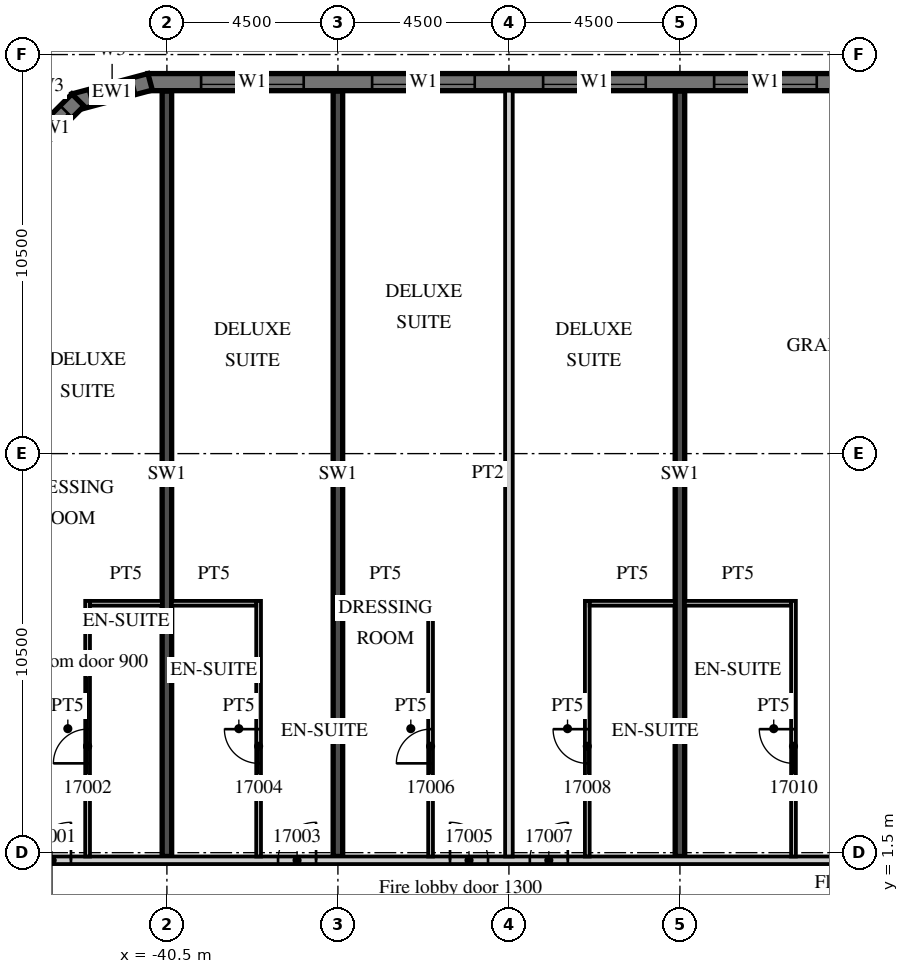
"""IFC4 building model, lengths in metres.
Left out: names, types, materials, properties, quantities, classifications, styles, units other than length and angle.
Written with IfcOpenShell. Run it as: python <this file> out.ifc"""

import sys

from ifc_helpers import new_model, si_unit, direction, frame, frame_2d, origin, place, context, subcontext, project, spatial, polyline, rectangle, outline, extrude, element, fill, save


model = new_model("IFC4")
c1 = context("Model", 3, precision=1e-05, world=origin(), true_north=direction((0.0, 1.0)))
c2 = subcontext(c1, "Body", "Model", "MODEL_VIEW")
j1 = project(units=[si_unit("LENGTHUNIT", "METRE"), si_unit("PLANEANGLEUNIT", "RADIAN")], contexts=[c1])
p1 = place(None, origin())
s1 = spatial("IfcSite", under=j1, at=p1, CompositionType="ELEMENT")
p2 = place(p1, origin())
s2 = spatial("IfcBuilding", under=s1, at=p2, CompositionType="ELEMENT")
p3 = place(p2, frame((0.0, 0.0, 86.4)))
s3 = spatial("IfcBuildingStorey", under=s2, at=p3, CompositionType="ELEMENT", Elevation=86.4)
for number, where, z_axis, x_axis in (
    (1, (-40.5, 1.4, 0.0), (0.0, 0.0, 1.0), (0.0, 1.0, 0.0)),
    (2, (-36.0, 1.4, 0.0), (0.0, 0.0, 1.0), (0.0, 1.0, 0.0)),
    (3, (-27.0, 1.4, 0.0), (0.0, 0.0, 1.0), (0.0, 1.0, 0.0)),
):
    element("IfcWall", number, at=place(p3, frame(where, z_axis=z_axis, x_axis=x_axis)), inside=s3, PredefinedType="SHEAR", context=c2, shape_type="SweptSolid", body=[
        extrude(rectangle(XDim=20.14, YDim=0.25, at=frame_2d((10.07, 0.0))), origin(), (0.0, 0.0, 1.0), 3.3),
    ])
p4 = place(p3, frame((13.5, 21.775, 0.0), z_axis=(0.0, 0.0, 1.0), x_axis=(-1.0, 0.0, 0.0)))
e4 = element("IfcWall", 4, at=p4, inside=s3, PredefinedType="SOLIDWALL", context=c2, shape_type="SweptSolid", body=[
    extrude(rectangle(XDim=54.5, YDim=0.45, at=frame_2d((27.25, 0.0))), origin(), (0.0, 0.0, 1.0), 3.02),
])
p5 = place(p4, frame((0.9, 0.0, 0.45)))
e5 = element("IfcOpeningElement", 5, at=p5, cuts=e4, PredefinedType="OPENING", context=c2, shape_type="SweptSolid", body=[
    extrude(rectangle(XDim=2.7, YDim=2.25, at=frame_2d((1.35, 1.125))), frame((0.0, 0.235, 0.0), z_axis=(0.0, -1.0, 0.0), x_axis=(1.0, 0.0, 0.0)), (0.0, 0.0, 1.0), 0.47),
])
p6 = place(p4, frame((5.4, 0.0, 0.45)))
e6 = element("IfcOpeningElement", 6, at=p6, cuts=e4, PredefinedType="OPENING", context=c2, shape_type="SweptSolid", body=[
    extrude(rectangle(XDim=2.7, YDim=2.25, at=frame_2d((1.35, 1.125))), frame((0.0, 0.235, 0.0), z_axis=(0.0, -1.0, 0.0), x_axis=(1.0, 0.0, 0.0)), (0.0, 0.0, 1.0), 0.47),
])
p7 = place(p4, frame((9.9, 0.0, 0.45)))
e7 = element("IfcOpeningElement", 7, at=p7, cuts=e4, PredefinedType="OPENING", context=c2, shape_type="SweptSolid", body=[
    extrude(rectangle(XDim=2.7, YDim=2.25, at=frame_2d((1.35, 1.125))), frame((0.0, 0.235, 0.0), z_axis=(0.0, -1.0, 0.0), x_axis=(1.0, 0.0, 0.0)), (0.0, 0.0, 1.0), 0.47),
])
p8 = place(p4, frame((14.4, 0.0, 0.45)))
e8 = element("IfcOpeningElement", 8, at=p8, cuts=e4, PredefinedType="OPENING", context=c2, shape_type="SweptSolid", body=[
    extrude(rectangle(XDim=2.7, YDim=2.25, at=frame_2d((1.35, 1.125))), frame((0.0, 0.235, 0.0), z_axis=(0.0, -1.0, 0.0), x_axis=(1.0, 0.0, 0.0)), (0.0, 0.0, 1.0), 0.47),
])
p9 = place(p4, frame((18.9, 0.0, 0.45)))
e9 = element("IfcOpeningElement", 9, at=p9, cuts=e4, PredefinedType="OPENING", context=c2, shape_type="SweptSolid", body=[
    extrude(rectangle(XDim=2.7, YDim=2.25, at=frame_2d((1.35, 1.125))), frame((0.0, 0.235, 0.0), z_axis=(0.0, -1.0, 0.0), x_axis=(1.0, 0.0, 0.0)), (0.0, 0.0, 1.0), 0.47),
])
p10 = place(p4, frame((23.4, 0.0, 0.45)))
e10 = element("IfcOpeningElement", 10, at=p10, cuts=e4, PredefinedType="OPENING", context=c2, shape_type="SweptSolid", body=[
    extrude(rectangle(XDim=2.7, YDim=2.25, at=frame_2d((1.35, 1.125))), frame((0.0, 0.235, 0.0), z_axis=(0.0, -1.0, 0.0), x_axis=(1.0, 0.0, 0.0)), (0.0, 0.0, 1.0), 0.47),
])
p11 = place(p4, frame((27.9, 0.0, 0.45)))
e11 = element("IfcOpeningElement", 11, at=p11, cuts=e4, PredefinedType="OPENING", context=c2, shape_type="SweptSolid", body=[
    extrude(rectangle(XDim=2.7, YDim=2.25, at=frame_2d((1.35, 1.125))), frame((0.0, 0.235, 0.0), z_axis=(0.0, -1.0, 0.0), x_axis=(1.0, 0.0, 0.0)), (0.0, 0.0, 1.0), 0.47),
])
p12 = place(p4, frame((32.4, 0.0, 0.45)))
e12 = element("IfcOpeningElement", 12, at=p12, cuts=e4, PredefinedType="OPENING", context=c2, shape_type="SweptSolid", body=[
    extrude(rectangle(XDim=2.7, YDim=2.25, at=frame_2d((1.35, 1.125))), frame((0.0, 0.235, 0.0), z_axis=(0.0, -1.0, 0.0), x_axis=(1.0, 0.0, 0.0)), (0.0, 0.0, 1.0), 0.47),
])
p13 = place(p4, frame((36.9, 0.0, 0.45)))
e13 = element("IfcOpeningElement", 13, at=p13, cuts=e4, PredefinedType="OPENING", context=c2, shape_type="SweptSolid", body=[
    extrude(rectangle(XDim=2.7, YDim=2.25, at=frame_2d((1.35, 1.125))), frame((0.0, 0.235, 0.0), z_axis=(0.0, -1.0, 0.0), x_axis=(1.0, 0.0, 0.0)), (0.0, 0.0, 1.0), 0.47),
])
p14 = place(p4, frame((41.4, 0.0, 0.45)))
e14 = element("IfcOpeningElement", 14, at=p14, cuts=e4, PredefinedType="OPENING", context=c2, shape_type="SweptSolid", body=[
    extrude(rectangle(XDim=2.7, YDim=2.25, at=frame_2d((1.35, 1.125))), frame((0.0, 0.235, 0.0), z_axis=(0.0, -1.0, 0.0), x_axis=(1.0, 0.0, 0.0)), (0.0, 0.0, 1.0), 0.47),
])
p15 = place(p4, frame((45.9, 0.0, 0.45)))
e15 = element("IfcOpeningElement", 15, at=p15, cuts=e4, PredefinedType="OPENING", context=c2, shape_type="SweptSolid", body=[
    extrude(rectangle(XDim=2.7, YDim=2.25, at=frame_2d((1.35, 1.125))), frame((0.0, 0.235, 0.0), z_axis=(0.0, -1.0, 0.0), x_axis=(1.0, 0.0, 0.0)), (0.0, 0.0, 1.0), 0.47),
])
p16 = place(p4, frame((50.4, 0.0, 0.45)))
e16 = element("IfcOpeningElement", 16, at=p16, cuts=e4, PredefinedType="OPENING", context=c2, shape_type="SweptSolid", body=[
    extrude(rectangle(XDim=2.7, YDim=2.25, at=frame_2d((1.35, 1.125))), frame((0.0, 0.235, 0.0), z_axis=(0.0, -1.0, 0.0), x_axis=(1.0, 0.0, 0.0)), (0.0, 0.0, 1.0), 0.47),
])
p17 = place(p3, frame((-40.942, 21.783, 0.0), z_axis=(0.0, 0.0, 1.0), x_axis=(-0.965926999034, -0.25881466832, 0.0)))
e17 = element("IfcWall", 17, at=p17, inside=s3, PredefinedType="SOLIDWALL", context=c2, shape_type="SweptSolid", body=[
    extrude(outline(polyline([(0.0, -0.225), (2.071, -0.225), (1.95, 0.225), (0.121, 0.225), (0.0, -0.225)])), origin(), (0.0, 0.0, 1.0), 3.02),
])
p18 = place(p17, frame((0.435, 0.0, 0.45)))
e18 = element("IfcOpeningElement", 18, at=p18, cuts=e17, PredefinedType="OPENING", context=c2, shape_type="SweptSolid", body=[
    extrude(rectangle(XDim=1.2, YDim=2.25, at=frame_2d((0.6, 1.125))), frame((0.0, 0.235, 0.0), z_axis=(0.0, -1.0, 0.0), x_axis=(1.0, 0.0, 0.0)), (0.0, 0.0, 1.0), 0.47),
])
p19 = place(p3, frame((-42.841, 21.305, 0.0), z_axis=(0.0, 0.0, 1.0), x_axis=(-0.707106781187, -0.707106781187, 0.0)))
e19 = element("IfcWall", 19, at=p19, inside=s3, PredefinedType="SOLIDWALL", context=c2, shape_type="SweptSolid", body=[
    extrude(outline(polyline([(0.0, -0.225), (2.071, -0.225), (1.95, 0.225), (0.121, 0.225), (0.0, -0.225)])), origin(), (0.0, 0.0, 1.0), 3.02),
])
p20 = place(p19, frame((0.435, 0.0, 0.45)))
e20 = element("IfcOpeningElement", 20, at=p20, cuts=e19, PredefinedType="OPENING", context=c2, shape_type="SweptSolid", body=[
    extrude(rectangle(XDim=1.2, YDim=2.25, at=frame_2d((0.6, 1.125))), frame((0.0, 0.235, 0.0), z_axis=(0.0, -1.0, 0.0), x_axis=(1.0, 0.0, 0.0)), (0.0, 0.0, 1.0), 0.47),
])
p21 = place(p3, frame((-44.55, 1.3, 0.0), z_axis=(0.0, 0.0, 1.0), x_axis=(1.0, 0.0, 0.0)))
e21 = element("IfcWall", 21, at=p21, inside=s3, PredefinedType="PARTITIONING", context=c2, shape_type="SweptSolid", body=[
    extrude(rectangle(XDim=58.05, YDim=0.2, at=frame_2d((29.025, 0.0))), origin(), (0.0, 0.0, 1.0), 3.02),
])
p22 = place(p21, frame((0.525, 0.0, 0.0)))
e22 = element("IfcOpeningElement", 22, at=p22, cuts=e21, PredefinedType="OPENING", context=c2, shape_type="SweptSolid", body=[
    extrude(rectangle(XDim=1.0, YDim=2.1, at=frame_2d((0.5, 1.05))), frame((0.0, 0.11, 0.0), z_axis=(0.0, -1.0, 0.0), x_axis=(1.0, 0.0, 0.0)), (0.0, 0.0, 1.0), 0.22),
])
p23 = place(p21, frame((6.975, 0.0, 0.0)))
e23 = element("IfcOpeningElement", 23, at=p23, cuts=e21, PredefinedType="OPENING", context=c2, shape_type="SweptSolid", body=[
    extrude(rectangle(XDim=1.0, YDim=2.1, at=frame_2d((0.5, 1.05))), frame((0.0, 0.11, 0.0), z_axis=(0.0, -1.0, 0.0), x_axis=(1.0, 0.0, 0.0)), (0.0, 0.0, 1.0), 0.22),
])
p24 = place(p21, frame((11.5, 0.0, 0.0)))
e24 = element("IfcOpeningElement", 24, at=p24, cuts=e21, PredefinedType="OPENING", context=c2, shape_type="SweptSolid", body=[
    extrude(rectangle(XDim=1.0, YDim=2.1, at=frame_2d((0.5, 1.05))), frame((0.0, 0.11, 0.0), z_axis=(0.0, -1.0, 0.0), x_axis=(1.0, 0.0, 0.0)), (0.0, 0.0, 1.0), 0.22),
])
p25 = place(p21, frame((13.6, 0.0, 0.0)))
e25 = element("IfcOpeningElement", 25, at=p25, cuts=e21, PredefinedType="OPENING", context=c2, shape_type="SweptSolid", body=[
    extrude(rectangle(XDim=1.0, YDim=2.1, at=frame_2d((0.5, 1.05))), frame((0.0, 0.11, 0.0), z_axis=(0.0, -1.0, 0.0), x_axis=(1.0, 0.0, 0.0)), (0.0, 0.0, 1.0), 0.22),
])
p26 = place(p21, frame((22.912, 0.0, 0.0)))
e26 = element("IfcOpeningElement", 26, at=p26, cuts=e21, PredefinedType="OPENING", context=c2, shape_type="SweptSolid", body=[
    extrude(rectangle(XDim=1.2, YDim=2.1, at=frame_2d((0.6, 1.05))), frame((0.0, 0.11, 0.0), z_axis=(0.0, -1.0, 0.0), x_axis=(1.0, 0.0, 0.0)), (0.0, 0.0, 1.0), 0.22),
])
p27 = place(p21, frame((31.912, 0.0, 0.0)))
e27 = element("IfcOpeningElement", 27, at=p27, cuts=e21, PredefinedType="OPENING", context=c2, shape_type="SweptSolid", body=[
    extrude(rectangle(XDim=1.2, YDim=2.1, at=frame_2d((0.6, 1.05))), frame((0.0, 0.11, 0.0), z_axis=(0.0, -1.0, 0.0), x_axis=(1.0, 0.0, 0.0)), (0.0, 0.0, 1.0), 0.22),
])
p28 = place(p21, frame((37.987, 0.0, 0.0)))
e28 = element("IfcOpeningElement", 28, at=p28, cuts=e21, PredefinedType="OPENING", context=c2, shape_type="SweptSolid", body=[
    extrude(rectangle(XDim=1.2, YDim=2.1, at=frame_2d((0.6, 1.05))), frame((0.0, 0.11, 0.0), z_axis=(0.0, -1.0, 0.0), x_axis=(1.0, 0.0, 0.0)), (0.0, 0.0, 1.0), 0.22),
])
p29 = place(p21, frame((46.987, 0.0, 0.0)))
e29 = element("IfcOpeningElement", 29, at=p29, cuts=e21, PredefinedType="OPENING", context=c2, shape_type="SweptSolid", body=[
    extrude(rectangle(XDim=1.2, YDim=2.1, at=frame_2d((0.6, 1.05))), frame((0.0, 0.11, 0.0), z_axis=(0.0, -1.0, 0.0), x_axis=(1.0, 0.0, 0.0)), (0.0, 0.0, 1.0), 0.22),
])
p30 = place(p21, frame((54.125, 0.0, 0.0)))
e30 = element("IfcOpeningElement", 30, at=p30, cuts=e21, PredefinedType="OPENING", context=c2, shape_type="SweptSolid", body=[
    extrude(rectangle(XDim=1.0, YDim=2.1, at=frame_2d((0.5, 1.05))), frame((0.0, 0.11, 0.0), z_axis=(0.0, -1.0, 0.0), x_axis=(1.0, 0.0, 0.0)), (0.0, 0.0, 1.0), 0.22),
])
p31 = place(p3, frame((-42.587, 1.4, 0.0), z_axis=(0.0, 0.0, 1.0), x_axis=(0.0, 1.0, 0.0)))
e31 = element("IfcWall", 31, at=p31, inside=s3, PredefinedType="PARTITIONING", context=c2, shape_type="SweptSolid", body=[
    extrude(rectangle(XDim=6.725, YDim=0.125, at=frame_2d((3.363, 0.0))), origin(), (0.0, 0.0, 1.0), 3.02),
])
p32 = place(p31, frame((2.45, 0.0, 0.0)))
e32 = element("IfcOpeningElement", 32, at=p32, cuts=e31, PredefinedType="OPENING", context=c2, shape_type="SweptSolid", body=[
    extrude(rectangle(XDim=0.9, YDim=2.1, at=frame_2d((0.45, 1.05))), frame((0.0, 0.073, 0.0), z_axis=(0.0, -1.0, 0.0), x_axis=(1.0, 0.0, 0.0)), (0.0, 0.0, 1.0), 0.145),
])
p33 = place(p3, frame((-42.525, 8.062, 0.0), z_axis=(0.0, 0.0, 1.0), x_axis=(1.0, 0.0, 0.0)))
e33 = element("IfcWall", 33, at=p33, inside=s3, PredefinedType="PARTITIONING", context=c2, shape_type="SweptSolid", body=[
    extrude(rectangle(XDim=1.9, YDim=0.125, at=frame_2d((0.95, 0.0))), origin(), (0.0, 0.0, 1.0), 3.02),
])
p34 = place(p3, frame((-38.087, 1.4, 0.0), z_axis=(0.0, 0.0, 1.0), x_axis=(0.0, 1.0, 0.0)))
e34 = element("IfcWall", 34, at=p34, inside=s3, PredefinedType="PARTITIONING", context=c2, shape_type="SweptSolid", body=[
    extrude(rectangle(XDim=6.725, YDim=0.125, at=frame_2d((3.363, 0.0))), origin(), (0.0, 0.0, 1.0), 3.02),
])
p35 = place(p34, frame((2.45, 0.0, 0.0)))
e35 = element("IfcOpeningElement", 35, at=p35, cuts=e34, PredefinedType="OPENING", context=c2, shape_type="SweptSolid", body=[
    extrude(rectangle(XDim=0.9, YDim=2.1, at=frame_2d((0.45, 1.05))), frame((0.0, 0.073, 0.0), z_axis=(0.0, -1.0, 0.0), x_axis=(1.0, 0.0, 0.0)), (0.0, 0.0, 1.0), 0.145),
])
p36 = place(p3, frame((-40.375, 8.062, 0.0), z_axis=(0.0, 0.0, 1.0), x_axis=(1.0, 0.0, 0.0)))
e36 = element("IfcWall", 36, at=p36, inside=s3, PredefinedType="PARTITIONING", context=c2, shape_type="SweptSolid", body=[
    extrude(rectangle(XDim=2.225, YDim=0.125, at=frame_2d((1.113, 0.0))), origin(), (0.0, 0.0, 1.0), 3.02),
])
p37 = place(p3, frame((-31.5, 1.4, 0.0), z_axis=(0.0, 0.0, 1.0), x_axis=(0.0, 1.0, 0.0)))
e37 = element("IfcWall", 37, at=p37, inside=s3, PredefinedType="PARTITIONING", context=c2, shape_type="SweptSolid", body=[
    extrude(rectangle(XDim=20.15, YDim=0.2, at=frame_2d((10.075, 0.0))), origin(), (0.0, 0.0, 1.0), 3.02),
])
p38 = place(p3, frame((-33.562, 1.4, 0.0), z_axis=(0.0, 0.0, 1.0), x_axis=(0.0, 1.0, 0.0)))
e38 = element("IfcWall", 38, at=p38, inside=s3, PredefinedType="PARTITIONING", context=c2, shape_type="SweptSolid", body=[
    extrude(rectangle(XDim=6.725, YDim=0.125, at=frame_2d((3.363, 0.0))), origin(), (0.0, 0.0, 1.0), 3.02),
])
p39 = place(p38, frame((2.45, 0.0, 0.0)))
e39 = element("IfcOpeningElement", 39, at=p39, cuts=e38, PredefinedType="OPENING", context=c2, shape_type="SweptSolid", body=[
    extrude(rectangle(XDim=0.9, YDim=2.1, at=frame_2d((0.45, 1.05))), frame((0.0, 0.073, 0.0), z_axis=(0.0, -1.0, 0.0), x_axis=(1.0, 0.0, 0.0)), (0.0, 0.0, 1.0), 0.145),
])
p40 = place(p3, frame((-35.875, 8.062, 0.0), z_axis=(0.0, 0.0, 1.0), x_axis=(1.0, 0.0, 0.0)))
e40 = element("IfcWall", 40, at=p40, inside=s3, PredefinedType="PARTITIONING", context=c2, shape_type="SweptSolid", body=[
    extrude(rectangle(XDim=2.25, YDim=0.125, at=frame_2d((1.125, 0.0))), origin(), (0.0, 0.0, 1.0), 3.02),
])
p41 = place(p3, frame((-29.438, 1.4, 0.0), z_axis=(0.0, 0.0, 1.0), x_axis=(0.0, 1.0, 0.0)))
e41 = element("IfcWall", 41, at=p41, inside=s3, PredefinedType="PARTITIONING", context=c2, shape_type="SweptSolid", body=[
    extrude(rectangle(XDim=6.725, YDim=0.125, at=frame_2d((3.363, 0.0))), origin(), (0.0, 0.0, 1.0), 3.02),
])
p42 = place(p41, frame((2.45, 0.0, 0.0)))
e42 = element("IfcOpeningElement", 42, at=p42, cuts=e41, PredefinedType="OPENING", context=c2, shape_type="SweptSolid", body=[
    extrude(rectangle(XDim=0.9, YDim=2.1, at=frame_2d((0.45, 1.05))), frame((0.0, 0.073, 0.0), z_axis=(0.0, -1.0, 0.0), x_axis=(1.0, 0.0, 0.0)), (0.0, 0.0, 1.0), 0.145),
])
p43 = place(p3, frame((-29.375, 8.062, 0.0), z_axis=(0.0, 0.0, 1.0), x_axis=(1.0, 0.0, 0.0)))
e43 = element("IfcWall", 43, at=p43, inside=s3, PredefinedType="PARTITIONING", context=c2, shape_type="SweptSolid", body=[
    extrude(rectangle(XDim=2.25, YDim=0.125, at=frame_2d((1.125, 0.0))), origin(), (0.0, 0.0, 1.0), 3.02),
])
p44 = place(p3, frame((-24.012, 1.4, 0.0), z_axis=(0.0, 0.0, 1.0), x_axis=(0.0, 1.0, 0.0)))
e44 = element("IfcWall", 44, at=p44, inside=s3, PredefinedType="PARTITIONING", context=c2, shape_type="SweptSolid", body=[
    extrude(rectangle(XDim=6.725, YDim=0.125, at=frame_2d((3.363, 0.0))), origin(), (0.0, 0.0, 1.0), 3.02),
])
p45 = place(p44, frame((2.45, 0.0, 0.0)))
e45 = element("IfcOpeningElement", 45, at=p45, cuts=e44, PredefinedType="OPENING", context=c2, shape_type="SweptSolid", body=[
    extrude(rectangle(XDim=0.9, YDim=2.1, at=frame_2d((0.45, 1.05))), frame((0.0, 0.073, 0.0), z_axis=(0.0, -1.0, 0.0), x_axis=(1.0, 0.0, 0.0)), (0.0, 0.0, 1.0), 0.145),
])
p46 = place(p3, frame((-26.875, 8.062, 0.0), z_axis=(0.0, 0.0, 1.0), x_axis=(1.0, 0.0, 0.0)))
e46 = element("IfcWall", 46, at=p46, inside=s3, PredefinedType="PARTITIONING", context=c2, shape_type="SweptSolid", body=[
    extrude(rectangle(XDim=2.8, YDim=0.125, at=frame_2d((1.4, 0.0))), origin(), (0.0, 0.0, 1.0), 3.02),
])
p47 = place(p13, origin())
e47 = element("IfcWindow", 47, at=p47, inside=s3, PartitioningType="SINGLE_PANEL", PredefinedType="WINDOW", context=c2, shape_type="SweptSolid", body=[
    extrude(rectangle(XDim=2.7, YDim=2.25, at=frame_2d((1.35, 1.125))), frame((0.0, 0.09, 0.0), z_axis=(0.0, -1.0, 0.0), x_axis=(1.0, 0.0, 0.0)), (0.0, 0.0, 1.0), 0.06),
])
fill(e13, e47)
p48 = place(p14, origin())
e48 = element("IfcWindow", 48, at=p48, inside=s3, PartitioningType="SINGLE_PANEL", PredefinedType="WINDOW", context=c2, shape_type="SweptSolid", body=[
    extrude(rectangle(XDim=2.7, YDim=2.25, at=frame_2d((1.35, 1.125))), frame((0.0, 0.09, 0.0), z_axis=(0.0, -1.0, 0.0), x_axis=(1.0, 0.0, 0.0)), (0.0, 0.0, 1.0), 0.06),
])
fill(e14, e48)
p49 = place(p15, origin())
e49 = element("IfcWindow", 49, at=p49, inside=s3, PartitioningType="SINGLE_PANEL", PredefinedType="WINDOW", context=c2, shape_type="SweptSolid", body=[
    extrude(rectangle(XDim=2.7, YDim=2.25, at=frame_2d((1.35, 1.125))), frame((0.0, 0.09, 0.0), z_axis=(0.0, -1.0, 0.0), x_axis=(1.0, 0.0, 0.0)), (0.0, 0.0, 1.0), 0.06),
])
fill(e15, e49)
p50 = place(p16, origin())
e50 = element("IfcWindow", 50, at=p50, inside=s3, PartitioningType="SINGLE_PANEL", PredefinedType="WINDOW", context=c2, shape_type="SweptSolid", body=[
    extrude(rectangle(XDim=2.7, YDim=2.25, at=frame_2d((1.35, 1.125))), frame((0.0, 0.09, 0.0), z_axis=(0.0, -1.0, 0.0), x_axis=(1.0, 0.0, 0.0)), (0.0, 0.0, 1.0), 0.06),
])
fill(e16, e50)
p51 = place(p18, origin())
e51 = element("IfcWindow", 51, at=p51, inside=s3, PartitioningType="SINGLE_PANEL", PredefinedType="WINDOW", context=c2, shape_type="SweptSolid", body=[
    extrude(rectangle(XDim=1.2, YDim=2.25, at=frame_2d((0.6, 1.125))), frame((0.0, 0.09, 0.0), z_axis=(0.0, -1.0, 0.0), x_axis=(1.0, 0.0, 0.0)), (0.0, 0.0, 1.0), 0.06),
])
fill(e18, e51)
p52 = place(p20, origin())
e52 = element("IfcWindow", 52, at=p52, inside=s3, PartitioningType="SINGLE_PANEL", PredefinedType="WINDOW", context=c2, shape_type="SweptSolid", body=[
    extrude(rectangle(XDim=1.2, YDim=2.25, at=frame_2d((0.6, 1.125))), frame((0.0, 0.09, 0.0), z_axis=(0.0, -1.0, 0.0), x_axis=(1.0, 0.0, 0.0)), (0.0, 0.0, 1.0), 0.06),
])
fill(e20, e52)
p53 = place(p22, origin())
e53 = element("IfcDoor", 53, at=p53, inside=s3, OperationType="SINGLE_SWING_RIGHT", PredefinedType="DOOR", context=c2, shape_type="SweptSolid", body=[
    extrude(rectangle(XDim=1.0, YDim=2.1, at=frame_2d((0.5, 1.05))), frame((0.0, 0.025, 0.0), z_axis=(0.0, -1.0, 0.0), x_axis=(1.0, 0.0, 0.0)), (0.0, 0.0, 1.0), 0.05),
])
fill(e22, e53)
p54 = place(p32, origin())
e54 = element("IfcDoor", 54, at=p54, inside=s3, OperationType="SINGLE_SWING_LEFT", PredefinedType="DOOR", context=c2, shape_type="SweptSolid", body=[
    extrude(rectangle(XDim=0.9, YDim=2.1, at=frame_2d((0.45, 1.05))), frame((0.0, 0.025, 0.0), z_axis=(0.0, -1.0, 0.0), x_axis=(1.0, 0.0, 0.0)), (0.0, 0.0, 1.0), 0.05),
])
fill(e32, e54)
p55 = place(p23, origin())
e55 = element("IfcDoor", 55, at=p55, inside=s3, OperationType="SINGLE_SWING_RIGHT", PredefinedType="DOOR", context=c2, shape_type="SweptSolid", body=[
    extrude(rectangle(XDim=1.0, YDim=2.1, at=frame_2d((0.5, 1.05))), frame((0.0, 0.025, 0.0), z_axis=(0.0, -1.0, 0.0), x_axis=(1.0, 0.0, 0.0)), (0.0, 0.0, 1.0), 0.05),
])
fill(e23, e55)
p56 = place(p35, origin())
e56 = element("IfcDoor", 56, at=p56, inside=s3, OperationType="SINGLE_SWING_RIGHT", PredefinedType="DOOR", context=c2, shape_type="SweptSolid", body=[
    extrude(rectangle(XDim=0.9, YDim=2.1, at=frame_2d((0.45, 1.05))), frame((0.0, 0.025, 0.0), z_axis=(0.0, -1.0, 0.0), x_axis=(1.0, 0.0, 0.0)), (0.0, 0.0, 1.0), 0.05),
])
fill(e35, e56)
p57 = place(p24, origin())
e57 = element("IfcDoor", 57, at=p57, inside=s3, OperationType="SINGLE_SWING_LEFT", PredefinedType="DOOR", context=c2, shape_type="SweptSolid", body=[
    extrude(rectangle(XDim=1.0, YDim=2.1, at=frame_2d((0.5, 1.05))), frame((0.0, 0.025, 0.0), z_axis=(0.0, -1.0, 0.0), x_axis=(1.0, 0.0, 0.0)), (0.0, 0.0, 1.0), 0.05),
])
fill(e24, e57)
p58 = place(p39, origin())
e58 = element("IfcDoor", 58, at=p58, inside=s3, OperationType="SINGLE_SWING_LEFT", PredefinedType="DOOR", context=c2, shape_type="SweptSolid", body=[
    extrude(rectangle(XDim=0.9, YDim=2.1, at=frame_2d((0.45, 1.05))), frame((0.0, 0.025, 0.0), z_axis=(0.0, -1.0, 0.0), x_axis=(1.0, 0.0, 0.0)), (0.0, 0.0, 1.0), 0.05),
])
fill(e39, e58)
p59 = place(p25, origin())
e59 = element("IfcDoor", 59, at=p59, inside=s3, OperationType="SINGLE_SWING_RIGHT", PredefinedType="DOOR", context=c2, shape_type="SweptSolid", body=[
    extrude(rectangle(XDim=1.0, YDim=2.1, at=frame_2d((0.5, 1.05))), frame((0.0, 0.025, 0.0), z_axis=(0.0, -1.0, 0.0), x_axis=(1.0, 0.0, 0.0)), (0.0, 0.0, 1.0), 0.05),
])
fill(e25, e59)
p60 = place(p42, origin())
e60 = element("IfcDoor", 60, at=p60, inside=s3, OperationType="SINGLE_SWING_RIGHT", PredefinedType="DOOR", context=c2, shape_type="SweptSolid", body=[
    extrude(rectangle(XDim=0.9, YDim=2.1, at=frame_2d((0.45, 1.05))), frame((0.0, 0.025, 0.0), z_axis=(0.0, -1.0, 0.0), x_axis=(1.0, 0.0, 0.0)), (0.0, 0.0, 1.0), 0.05),
])
fill(e42, e60)
p61 = place(p45, origin())
e61 = element("IfcDoor", 61, at=p61, inside=s3, OperationType="SINGLE_SWING_RIGHT", PredefinedType="DOOR", context=c2, shape_type="SweptSolid", body=[
    extrude(rectangle(XDim=0.9, YDim=2.1, at=frame_2d((0.45, 1.05))), frame((0.0, 0.025, 0.0), z_axis=(0.0, -1.0, 0.0), x_axis=(1.0, 0.0, 0.0)), (0.0, 0.0, 1.0), 0.05),
])
fill(e45, e61)
save(model, sys.argv[1])
